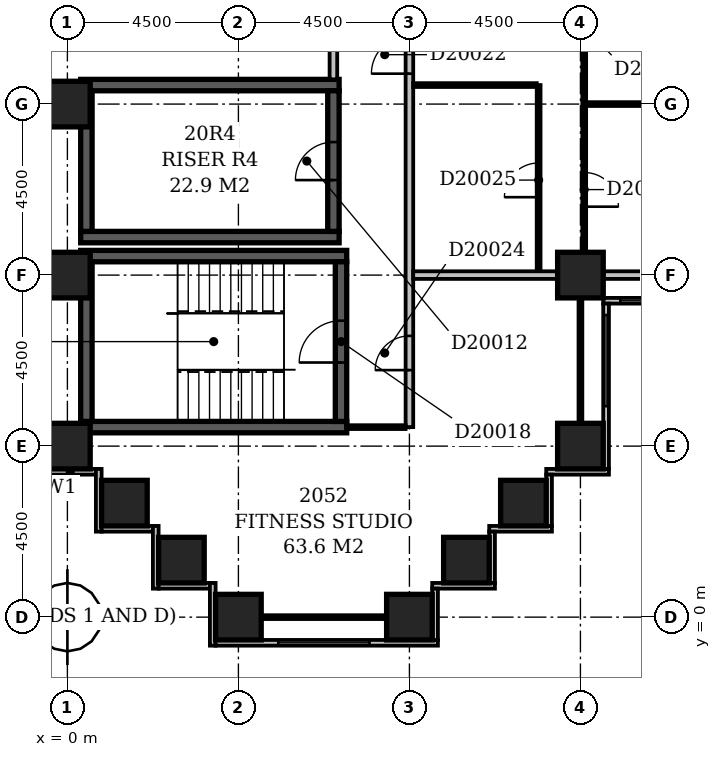
"""IFC4 building model, lengths in metres.
Left out: names, types, materials, properties, quantities, classifications, styles, units other than length and angle.
Written with IfcOpenShell. Run it as: python <this file> out.ifc"""

import sys

from ifc_helpers import new_model, si_unit, direction, frame, frame_2d, origin, origin_2d, place, context, subcontext, project, spatial, rectangle, extrude, element, fill, save


model = new_model("IFC4")
c1 = context("Model", 3, precision=1e-05, world=origin(), true_north=direction((0.0, 1.0)))
c2 = subcontext(c1, "Body", "Model", "MODEL_VIEW")
j1 = project(units=[si_unit("LENGTHUNIT", "METRE"), si_unit("PLANEANGLEUNIT", "RADIAN")], contexts=[c1])
p1 = place(None, origin())
s1 = spatial("IfcSite", under=j1, at=p1, CompositionType="ELEMENT")
p2 = place(p1, origin())
s2 = spatial("IfcBuilding", under=s1, at=p2, CompositionType="ELEMENT")
p3 = place(p2, frame((0.0, 0.0, 83.0)))
s3 = spatial("IfcBuildingStorey", under=s2, at=p3, CompositionType="ELEMENT", Elevation=83.0)
for number, where, z_axis, x_axis in (
    (1, (0.35, 5.0, -0.3), (0.0, 0.0, 1.0), (1.0, 0.0, 0.0)),
    (2, (0.35, 9.5, -0.3), (0.0, 0.0, 1.0), (1.0, 0.0, 0.0)),
):
    element("IfcWall", number, at=place(p3, frame(where, z_axis=z_axis, x_axis=x_axis)), inside=s3, PredefinedType="SHEAR", context=c2, shape_type="SweptSolid", body=[
        extrude(rectangle(XDim=7.0, YDim=0.3, at=frame_2d((3.5, 0.0))), origin(), (0.0, 0.0, 1.0), 3.6),
    ])
for number, where, z_axis, x_axis in (
    (3, (0.35, 10.0, -0.3), (0.0, 0.0, 1.0), (1.0, 0.0, 0.0)),
    (4, (0.35, 14.0, -0.3), (0.0, 0.0, 1.0), (1.0, 0.0, 0.0)),
):
    element("IfcWall", number, at=place(p3, frame(where, z_axis=z_axis, x_axis=x_axis)), inside=s3, PredefinedType="SHEAR", context=c2, shape_type="SweptSolid", body=[
        extrude(rectangle(XDim=6.8, YDim=0.3, at=frame_2d((3.4, 0.0))), origin(), (0.0, 0.0, 1.0), 3.6),
    ])
p4 = place(p3, frame((0.5, 5.15, -0.3), z_axis=(0.0, 0.0, 1.0), x_axis=(0.0, 1.0, 0.0)))
e5 = element("IfcWall", 5, at=p4, inside=s3, PredefinedType="SHEAR", context=c2, shape_type="SweptSolid", body=[
    extrude(rectangle(XDim=4.2, YDim=0.3, at=frame_2d((2.1, 0.0))), origin(), (0.0, 0.0, 1.0), 3.6),
])
p5 = place(p3, frame((0.5, 10.15, -0.3), z_axis=(0.0, 0.0, 1.0), x_axis=(0.0, 1.0, 0.0)))
e6 = element("IfcWall", 6, at=p5, inside=s3, PredefinedType="SHEAR", context=c2, shape_type="SweptSolid", body=[
    extrude(rectangle(XDim=3.7, YDim=0.3, at=frame_2d((1.85, 0.0))), origin(), (0.0, 0.0, 1.0), 3.6),
])
p6 = place(p3, frame((7.0, 10.15, -0.3), z_axis=(0.0, 0.0, 1.0), x_axis=(0.0, 1.0, 0.0)))
e7 = element("IfcWall", 7, at=p6, inside=s3, PredefinedType="SHEAR", context=c2, shape_type="SweptSolid", body=[
    extrude(rectangle(XDim=3.7, YDim=0.3, at=frame_2d((1.85, 0.0))), origin(), (0.0, 0.0, 1.0), 3.6),
])
p7 = place(p6, frame((1.35, 0.0, 0.3)))
e8 = element("IfcOpeningElement", 8, at=p7, cuts=e7, PredefinedType="OPENING", context=c2, shape_type="SweptSolid", body=[
    extrude(rectangle(XDim=1.0, YDim=2.1, at=frame_2d((0.5, 1.05))), frame((0.0, 0.162, 0.0), z_axis=(0.0, -1.0, 0.0), x_axis=(1.0, 0.0, 0.0)), (0.0, 0.0, 1.0), 0.324),
])
p8 = place(p3, frame((7.2, 5.15, -0.3), z_axis=(0.0, 0.0, 1.0), x_axis=(0.0, 1.0, 0.0)))
e9 = element("IfcWall", 9, at=p8, inside=s3, PredefinedType="SHEAR", context=c2, shape_type="SweptSolid", body=[
    extrude(rectangle(XDim=4.2, YDim=0.3, at=frame_2d((2.1, 0.0))), origin(), (0.0, 0.0, 1.0), 3.6),
])
p9 = place(p8, frame((1.55, 0.0, 0.3)))
e10 = element("IfcOpeningElement", 10, at=p9, cuts=e9, PredefinedType="OPENING", context=c2, shape_type="SweptSolid", body=[
    extrude(rectangle(XDim=1.1, YDim=2.1, at=frame_2d((0.55, 1.05))), frame((0.0, 0.162, 0.0), z_axis=(0.0, -1.0, 0.0), x_axis=(1.0, 0.0, 0.0)), (0.0, 0.0, 1.0), 0.324),
])
for number, where, z_axis, x_axis in (
    (11, (4.5, 0.0, -0.3), (0.0, 0.0, 1.0), (1.0, 0.0, 0.0)),
    (12, (9.0, 0.0, -0.3), (0.0, 0.0, 1.0), (1.0, 0.0, 0.0)),
    (13, (3.0, 1.5, -0.3), (0.0, 0.0, 1.0), (1.0, 0.0, 0.0)),
    (14, (10.5, 1.5, -0.3), (0.0, 0.0, 1.0), (1.0, 0.0, 0.0)),
    (15, (1.5, 3.0, -0.3), (0.0, 0.0, 1.0), (1.0, 0.0, 0.0)),
    (16, (12.0, 3.0, -0.3), (0.0, 0.0, 1.0), (1.0, 0.0, 0.0)),
    (17, (0.0, 4.5, -0.3), (0.0, 0.0, 1.0), (1.0, 0.0, 0.0)),
    (18, (13.5, 4.5, -0.3), (0.0, 0.0, 1.0), (1.0, 0.0, 0.0)),
    (19, (0.0, 9.0, -0.3), (0.0, 0.0, 1.0), (1.0, 0.0, 0.0)),
    (20, (13.5, 9.0, -0.3), (0.0, 0.0, 1.0), (1.0, 0.0, 0.0)),
    (21, (0.0, 13.5, -0.3), (0.0, 0.0, 1.0), (1.0, 0.0, 0.0)),
):
    element("IfcColumn", number, at=place(p3, frame(where, z_axis=z_axis, x_axis=x_axis)), inside=s3, PredefinedType="COLUMN", context=c2, shape_type="SweptSolid", body=[
        extrude(rectangle(XDim=1.2, YDim=1.2, at=origin_2d()), origin(), (0.0, 0.0, 1.0), 3.6),
    ])
p10 = place(p3, frame((9.675, -0.6, 0.0), z_axis=(0.0, 0.0, 1.0), x_axis=(0.0, 1.0, 0.0)))
e22 = element("IfcWall", 22, at=p10, inside=s3, PredefinedType="STANDARD", context=c2, shape_type="SweptSolid", body=[
    extrude(rectangle(XDim=1.35, YDim=0.15, at=frame_2d((0.675, 0.0))), origin(), (0.0, 0.0, 1.0), 2.7),
])
p11 = place(p3, frame((9.6, 0.825, 0.0), z_axis=(0.0, 0.0, 1.0), x_axis=(1.0, 0.0, 0.0)))
e23 = element("IfcWall", 23, at=p11, inside=s3, PredefinedType="STANDARD", context=c2, shape_type="SweptSolid", body=[
    extrude(rectangle(XDim=1.65, YDim=0.15, at=frame_2d((0.825, 0.0))), origin(), (0.0, 0.0, 1.0), 2.7),
])
p12 = place(p3, frame((11.175, 0.9, 0.0), z_axis=(0.0, 0.0, 1.0), x_axis=(0.0, 1.0, 0.0)))
e24 = element("IfcWall", 24, at=p12, inside=s3, PredefinedType="STANDARD", context=c2, shape_type="SweptSolid", body=[
    extrude(rectangle(XDim=1.35, YDim=0.15, at=frame_2d((0.675, 0.0))), origin(), (0.0, 0.0, 1.0), 2.7),
])
p13 = place(p3, frame((11.1, 2.325, 0.0), z_axis=(0.0, 0.0, 1.0), x_axis=(1.0, 0.0, 0.0)))
e25 = element("IfcWall", 25, at=p13, inside=s3, PredefinedType="STANDARD", context=c2, shape_type="SweptSolid", body=[
    extrude(rectangle(XDim=1.65, YDim=0.15, at=frame_2d((0.825, 0.0))), origin(), (0.0, 0.0, 1.0), 2.7),
])
p14 = place(p3, frame((12.675, 2.4, 0.0), z_axis=(0.0, 0.0, 1.0), x_axis=(0.0, 1.0, 0.0)))
e26 = element("IfcWall", 26, at=p14, inside=s3, PredefinedType="STANDARD", context=c2, shape_type="SweptSolid", body=[
    extrude(rectangle(XDim=1.35, YDim=0.15, at=frame_2d((0.675, 0.0))), origin(), (0.0, 0.0, 1.0), 2.7),
])
p15 = place(p3, frame((12.6, 3.825, 0.0), z_axis=(0.0, 0.0, 1.0), x_axis=(1.0, 0.0, 0.0)))
e27 = element("IfcWall", 27, at=p15, inside=s3, PredefinedType="STANDARD", context=c2, shape_type="SweptSolid", body=[
    extrude(rectangle(XDim=1.65, YDim=0.15, at=frame_2d((0.825, 0.0))), origin(), (0.0, 0.0, 1.0), 2.7),
])
p16 = place(p3, frame((14.175, 3.9, 0.0), z_axis=(0.0, 0.0, 1.0), x_axis=(0.0, 1.0, 0.0)))
e28 = element("IfcWall", 28, at=p16, inside=s3, PredefinedType="STANDARD", context=c2, shape_type="SweptSolid", body=[
    extrude(rectangle(XDim=4.35, YDim=0.15, at=frame_2d((2.175, 0.0))), origin(), (0.0, 0.0, 1.0), 2.7),
])
p17 = place(p16, frame((1.65, 0.0, 0.6)))
e29 = element("IfcOpeningElement", 29, at=p17, cuts=e28, PredefinedType="OPENING", context=c2, shape_type="SweptSolid", body=[
    extrude(rectangle(XDim=2.4, YDim=1.8, at=frame_2d((1.2, 0.9))), frame((0.0, 0.087, 0.0), z_axis=(0.0, -1.0, 0.0), x_axis=(1.0, 0.0, 0.0)), (0.0, 0.0, 1.0), 0.174),
])
p18 = place(p3, frame((14.1, 8.325, 0.0), z_axis=(0.0, 0.0, 1.0), x_axis=(1.0, 0.0, 0.0)))
e30 = element("IfcWall", 30, at=p18, inside=s3, PredefinedType="STANDARD", context=c2, shape_type="SweptSolid", body=[
    extrude(rectangle(XDim=4.65, YDim=0.15, at=frame_2d((2.325, 0.0))), origin(), (0.0, 0.0, 1.0), 2.7),
])
p19 = place(p18, frame((0.45, 0.0, 0.6)))
e31 = element("IfcOpeningElement", 31, at=p19, cuts=e30, PredefinedType="OPENING", context=c2, shape_type="SweptSolid", body=[
    extrude(rectangle(XDim=2.4, YDim=1.8, at=frame_2d((1.2, 0.9))), frame((0.0, 0.087, 0.0), z_axis=(0.0, -1.0, 0.0), x_axis=(1.0, 0.0, 0.0)), (0.0, 0.0, 1.0), 0.174),
])
p20 = place(p3, frame((-0.6, 3.825, 0.0), z_axis=(0.0, 0.0, 1.0), x_axis=(1.0, 0.0, 0.0)))
e32 = element("IfcWall", 32, at=p20, inside=s3, PredefinedType="STANDARD", context=c2, shape_type="SweptSolid", body=[
    extrude(rectangle(XDim=1.35, YDim=0.15, at=frame_2d((0.675, 0.0))), origin(), (0.0, 0.0, 1.0), 2.7),
])
p21 = place(p3, frame((0.825, 3.9, 0.0), z_axis=(0.0, 0.0, 1.0), x_axis=(0.0, -1.0, 0.0)))
e33 = element("IfcWall", 33, at=p21, inside=s3, PredefinedType="STANDARD", context=c2, shape_type="SweptSolid", body=[
    extrude(rectangle(XDim=1.65, YDim=0.15, at=frame_2d((0.825, 0.0))), origin(), (0.0, 0.0, 1.0), 2.7),
])
p22 = place(p3, frame((0.9, 2.325, 0.0), z_axis=(0.0, 0.0, 1.0), x_axis=(1.0, 0.0, 0.0)))
e34 = element("IfcWall", 34, at=p22, inside=s3, PredefinedType="STANDARD", context=c2, shape_type="SweptSolid", body=[
    extrude(rectangle(XDim=1.35, YDim=0.15, at=frame_2d((0.675, 0.0))), origin(), (0.0, 0.0, 1.0), 2.7),
])
p23 = place(p3, frame((2.325, 2.4, 0.0), z_axis=(0.0, 0.0, 1.0), x_axis=(0.0, -1.0, 0.0)))
e35 = element("IfcWall", 35, at=p23, inside=s3, PredefinedType="STANDARD", context=c2, shape_type="SweptSolid", body=[
    extrude(rectangle(XDim=1.65, YDim=0.15, at=frame_2d((0.825, 0.0))), origin(), (0.0, 0.0, 1.0), 2.7),
])
p24 = place(p3, frame((2.4, 0.825, 0.0), z_axis=(0.0, 0.0, 1.0), x_axis=(1.0, 0.0, 0.0)))
e36 = element("IfcWall", 36, at=p24, inside=s3, PredefinedType="STANDARD", context=c2, shape_type="SweptSolid", body=[
    extrude(rectangle(XDim=1.35, YDim=0.15, at=frame_2d((0.675, 0.0))), origin(), (0.0, 0.0, 1.0), 2.7),
])
p25 = place(p3, frame((3.825, 0.9, 0.0), z_axis=(0.0, 0.0, 1.0), x_axis=(0.0, -1.0, 0.0)))
e37 = element("IfcWall", 37, at=p25, inside=s3, PredefinedType="STANDARD", context=c2, shape_type="SweptSolid", body=[
    extrude(rectangle(XDim=1.65, YDim=0.15, at=frame_2d((0.825, 0.0))), origin(), (0.0, 0.0, 1.0), 2.7),
])
p26 = place(p3, frame((3.9, -0.675, 0.0), z_axis=(0.0, 0.0, 1.0), x_axis=(1.0, 0.0, 0.0)))
e38 = element("IfcWall", 38, at=p26, inside=s3, PredefinedType="STANDARD", context=c2, shape_type="SweptSolid", body=[
    extrude(rectangle(XDim=5.85, YDim=0.15, at=frame_2d((2.925, 0.0))), origin(), (0.0, 0.0, 1.0), 2.7),
])
p27 = place(p26, frame((1.65, 0.0, 0.6)))
e39 = element("IfcOpeningElement", 39, at=p27, cuts=e38, PredefinedType="OPENING", context=c2, shape_type="SweptSolid", body=[
    extrude(rectangle(XDim=2.4, YDim=1.8, at=frame_2d((1.2, 0.9))), frame((0.0, 0.087, 0.0), z_axis=(0.0, -1.0, 0.0), x_axis=(1.0, 0.0, 0.0)), (0.0, 0.0, 1.0), 0.174),
])
p28 = place(p3, frame((5.1, 0.0, 0.0), z_axis=(0.0, 0.0, 1.0), x_axis=(1.0, 0.0, 0.0)))
e40 = element("IfcWall", 40, at=p28, inside=s3, PredefinedType="PARTITIONING", context=c2, shape_type="SweptSolid", body=[
    extrude(rectangle(XDim=3.3, YDim=0.1, at=frame_2d((1.65, 0.0))), origin(), (0.0, 0.0, 1.0), 2.7),
])
p29 = place(p3, frame((0.0, 4.4, 0.0), z_axis=(0.0, 0.0, 1.0), x_axis=(0.0, 1.0, 0.0)))
e41 = element("IfcWall", 41, at=p29, inside=s3, PredefinedType="PARTITIONING", context=c2, shape_type="SweptSolid", body=[
    extrude(rectangle(XDim=0.7, YDim=0.1, at=frame_2d((0.35, 0.0))), origin(), (0.0, 0.0, 1.0), 2.7),
])
p30 = place(p3, frame((7.349, 5.0, 0.0), z_axis=(0.0, 0.0, 1.0), x_axis=(1.0, 0.0, 0.0)))
e42 = element("IfcWall", 42, at=p30, inside=s3, PredefinedType="PARTITIONING", context=c2, shape_type="SweptSolid", body=[
    extrude(rectangle(XDim=1.551, YDim=0.1, at=frame_2d((0.775, 0.0))), origin(), (0.0, 0.0, 1.0), 3.3),
])
p31 = place(p3, frame((9.0, 5.0, 0.0), z_axis=(0.0, 0.0, 1.0), x_axis=(0.0, 1.0, 0.0)))
e43 = element("IfcWall", 43, at=p31, inside=s3, PredefinedType="PARTITIONING", context=c2, shape_type="SweptSolid", body=[
    extrude(rectangle(XDim=44.5, YDim=0.2, at=frame_2d((22.25, 0.0))), origin(), (0.0, 0.0, 1.0), 3.3),
])
p32 = place(p31, frame((28.45, 0.0, 0.0)))
e44 = element("IfcOpeningElement", 44, at=p32, cuts=e43, PredefinedType="OPENING", context=c2, shape_type="SweptSolid", body=[
    extrude(rectangle(XDim=1.0, YDim=2.1, at=frame_2d((0.5, 1.05))), frame((0.0, 0.112, 0.0), z_axis=(0.0, -1.0, 0.0), x_axis=(1.0, 0.0, 0.0)), (0.0, 0.0, 1.0), 0.224),
])
p33 = place(p31, frame((22.8, 0.0, 0.0)))
e45 = element("IfcOpeningElement", 45, at=p33, cuts=e43, PredefinedType="OPENING", context=c2, shape_type="SweptSolid", body=[
    extrude(rectangle(XDim=1.0, YDim=2.1, at=frame_2d((0.5, 1.05))), frame((0.0, 0.112, 0.0), z_axis=(0.0, -1.0, 0.0), x_axis=(1.0, 0.0, 0.0)), (0.0, 0.0, 1.0), 0.224),
])
p34 = place(p31, frame((14.55, 0.0, 0.0)))
e46 = element("IfcOpeningElement", 46, at=p34, cuts=e43, PredefinedType="OPENING", context=c2, shape_type="SweptSolid", body=[
    extrude(rectangle(XDim=1.0, YDim=2.1, at=frame_2d((0.5, 1.05))), frame((0.0, 0.112, 0.0), z_axis=(0.0, -1.0, 0.0), x_axis=(1.0, 0.0, 0.0)), (0.0, 0.0, 1.0), 0.224),
])
p35 = place(p31, frame((9.3, 0.0, 0.0)))
e47 = element("IfcOpeningElement", 47, at=p35, cuts=e43, PredefinedType="OPENING", context=c2, shape_type="SweptSolid", body=[
    extrude(rectangle(XDim=1.0, YDim=2.1, at=frame_2d((0.5, 1.05))), frame((0.0, 0.112, 0.0), z_axis=(0.0, -1.0, 0.0), x_axis=(1.0, 0.0, 0.0)), (0.0, 0.0, 1.0), 0.224),
])
p36 = place(p31, frame((35.0, 0.0, 0.0)))
e48 = element("IfcOpeningElement", 48, at=p36, cuts=e43, PredefinedType="OPENING", context=c2, shape_type="SweptSolid", body=[
    extrude(rectangle(XDim=0.9, YDim=2.1, at=frame_2d((0.45, 1.05))), frame((0.0, 0.112, 0.0), z_axis=(0.0, -1.0, 0.0), x_axis=(1.0, 0.0, 0.0)), (0.0, 0.0, 1.0), 0.224),
])
p37 = place(p31, frame((1.5, 0.0, 0.0)))
e49 = element("IfcOpeningElement", 49, at=p37, cuts=e43, PredefinedType="OPENING", context=c2, shape_type="SweptSolid", body=[
    extrude(rectangle(XDim=0.9, YDim=2.1, at=frame_2d((0.45, 1.05))), frame((0.0, 0.112, 0.0), z_axis=(0.0, -1.0, 0.0), x_axis=(1.0, 0.0, 0.0)), (0.0, 0.0, 1.0), 0.224),
])
p38 = place(p3, frame((13.5, 5.1, 0.0), z_axis=(0.0, 0.0, 1.0), x_axis=(0.0, 1.0, 0.0)))
e50 = element("IfcWall", 50, at=p38, inside=s3, PredefinedType="PARTITIONING", context=c2, shape_type="SweptSolid", body=[
    extrude(rectangle(XDim=3.3, YDim=0.1, at=frame_2d((1.65, 0.0))), origin(), (0.0, 0.0, 1.0), 2.7),
])
p39 = place(p3, frame((9.1, 9.0, 0.0), z_axis=(0.0, 0.0, 1.0), x_axis=(1.0, 0.0, 0.0)))
e51 = element("IfcWall", 51, at=p39, inside=s3, PredefinedType="PARTITIONING", context=c2, shape_type="SweptSolid", body=[
    extrude(rectangle(XDim=3.8, YDim=0.2, at=frame_2d((1.9, 0.0))), origin(), (0.0, 0.0, 1.0), 3.3),
])
p40 = place(p3, frame((14.1, 9.0, 0.0), z_axis=(0.0, 0.0, 1.0), x_axis=(1.0, 0.0, 0.0)))
e52 = element("IfcWall", 52, at=p40, inside=s3, PredefinedType="PARTITIONING", context=c2, shape_type="SweptSolid", body=[
    extrude(rectangle(XDim=3.3, YDim=0.2, at=frame_2d((1.65, 0.0))), origin(), (0.0, 0.0, 1.0), 2.7),
])
p41 = place(p3, frame((12.4, 9.1, 0.0), z_axis=(0.0, 0.0, 1.0), x_axis=(0.0, 1.0, 0.0)))
e53 = element("IfcWall", 53, at=p41, inside=s3, PredefinedType="PARTITIONING", context=c2, shape_type="SweptSolid", body=[
    extrude(rectangle(XDim=4.9, YDim=0.1, at=frame_2d((2.45, 0.0))), origin(), (0.0, 0.0, 1.0), 3.3),
])
p42 = place(p41, frame((1.95, 0.0, 0.0)))
e54 = element("IfcOpeningElement", 54, at=p42, cuts=e53, PredefinedType="OPENING", context=c2, shape_type="SweptSolid", body=[
    extrude(rectangle(XDim=0.9, YDim=2.1, at=frame_2d((0.45, 1.05))), frame((0.0, 0.062, 0.0), z_axis=(0.0, -1.0, 0.0), x_axis=(1.0, 0.0, 0.0)), (0.0, 0.0, 1.0), 0.124),
])
p43 = place(p3, frame((13.6, 9.6, 0.0), z_axis=(0.0, 0.0, 1.0), x_axis=(0.0, 1.0, 0.0)))
e55 = element("IfcWall", 55, at=p43, inside=s3, PredefinedType="PARTITIONING", context=c2, shape_type="SweptSolid", body=[
    extrude(rectangle(XDim=8.3, YDim=0.1, at=frame_2d((4.15, 0.0))), origin(), (0.0, 0.0, 1.0), 3.3),
])
p44 = place(p43, frame((1.2, 0.0, 0.0)))
e56 = element("IfcOpeningElement", 56, at=p44, cuts=e55, PredefinedType="OPENING", context=c2, shape_type="SweptSolid", body=[
    extrude(rectangle(XDim=0.9, YDim=2.1, at=frame_2d((0.45, 1.05))), frame((0.0, 0.062, 0.0), z_axis=(0.0, -1.0, 0.0), x_axis=(1.0, 0.0, 0.0)), (0.0, 0.0, 1.0), 0.124),
])
p45 = place(p43, frame((5.7, 0.0, 0.0)))
e57 = element("IfcOpeningElement", 57, at=p45, cuts=e55, PredefinedType="OPENING", context=c2, shape_type="SweptSolid", body=[
    extrude(rectangle(XDim=0.9, YDim=2.1, at=frame_2d((0.45, 1.05))), frame((0.0, 0.062, 0.0), z_axis=(0.0, -1.0, 0.0), x_axis=(1.0, 0.0, 0.0)), (0.0, 0.0, 1.0), 0.124),
])
p46 = place(p3, frame((13.65, 13.5, 0.0), z_axis=(0.0, 0.0, 1.0), x_axis=(1.0, 0.0, 0.0)))
e58 = element("IfcWall", 58, at=p46, inside=s3, PredefinedType="PARTITIONING", context=c2, shape_type="SweptSolid", body=[
    extrude(rectangle(XDim=3.75, YDim=0.1, at=frame_2d((1.875, 0.0))), origin(), (0.0, 0.0, 1.0), 3.3),
])
p47 = place(p3, frame((9.1, 14.0, 0.0), z_axis=(0.0, 0.0, 1.0), x_axis=(1.0, 0.0, 0.0)))
e59 = element("IfcWall", 59, at=p47, inside=s3, PredefinedType="PARTITIONING", context=c2, shape_type="SweptSolid", body=[
    extrude(rectangle(XDim=3.25, YDim=0.1, at=frame_2d((1.625, 0.0))), origin(), (0.0, 0.0, 1.0), 3.3),
])
p48 = place(p3, frame((7.0, 14.15, 0.0), z_axis=(0.0, 0.0, 1.0), x_axis=(0.0, 1.0, 0.0)))
e60 = element("IfcWall", 60, at=p48, inside=s3, PredefinedType="PARTITIONING", context=c2, shape_type="SweptSolid", body=[
    extrude(rectangle(XDim=4.2, YDim=0.2, at=frame_2d((2.1, 0.0))), origin(), (0.0, 0.0, 1.0), 3.3),
])
p49 = place(p48, frame((1.6, 0.0, 0.0)))
e61 = element("IfcOpeningElement", 61, at=p49, cuts=e60, PredefinedType="OPENING", context=c2, shape_type="SweptSolid", body=[
    extrude(rectangle(XDim=1.0, YDim=2.1, at=frame_2d((0.5, 1.05))), frame((0.0, 0.112, 0.0), z_axis=(0.0, -1.0, 0.0), x_axis=(1.0, 0.0, 0.0)), (0.0, 0.0, 1.0), 0.224),
])
p50 = place(p17, origin())
e62 = element("IfcWindow", 62, at=p50, inside=s3, PartitioningType="SINGLE_PANEL", PredefinedType="WINDOW", context=c2, shape_type="SweptSolid", body=[
    extrude(rectangle(XDim=2.4, YDim=1.8, at=frame_2d((1.2, 0.9))), frame((0.0, 0.03, 0.0), z_axis=(0.0, -1.0, 0.0), x_axis=(1.0, 0.0, 0.0)), (0.0, 0.0, 1.0), 0.06),
])
fill(e29, e62)
p51 = place(p19, origin())
e63 = element("IfcWindow", 63, at=p51, inside=s3, PartitioningType="SINGLE_PANEL", PredefinedType="WINDOW", context=c2, shape_type="SweptSolid", body=[
    extrude(rectangle(XDim=2.4, YDim=1.8, at=frame_2d((1.2, 0.9))), frame((0.0, 0.03, 0.0), z_axis=(0.0, -1.0, 0.0), x_axis=(1.0, 0.0, 0.0)), (0.0, 0.0, 1.0), 0.06),
])
fill(e31, e63)
p52 = place(p27, origin())
e64 = element("IfcWindow", 64, at=p52, inside=s3, PartitioningType="SINGLE_PANEL", PredefinedType="WINDOW", context=c2, shape_type="SweptSolid", body=[
    extrude(rectangle(XDim=2.4, YDim=1.8, at=frame_2d((1.2, 0.9))), frame((0.0, 0.03, 0.0), z_axis=(0.0, -1.0, 0.0), x_axis=(1.0, 0.0, 0.0)), (0.0, 0.0, 1.0), 0.06),
])
fill(e39, e64)
p53 = place(p7, origin())
e65 = element("IfcDoor", 65, at=p53, inside=s3, OperationType="SINGLE_SWING_LEFT", PredefinedType="DOOR", context=c2, shape_type="SweptSolid", body=[
    extrude(rectangle(XDim=1.0, YDim=2.1, at=frame_2d((0.5, 1.05))), frame((0.0, 0.025, 0.0), z_axis=(0.0, -1.0, 0.0), x_axis=(1.0, 0.0, 0.0)), (0.0, 0.0, 1.0), 0.05),
])
fill(e8, e65)
p54 = place(p9, origin())
e66 = element("IfcDoor", 66, at=p54, inside=s3, OperationType="SINGLE_SWING_LEFT", PredefinedType="DOOR", context=c2, shape_type="SweptSolid", body=[
    extrude(rectangle(XDim=1.1, YDim=2.1, at=frame_2d((0.55, 1.05))), frame((0.0, 0.025, 0.0), z_axis=(0.0, -1.0, 0.0), x_axis=(1.0, 0.0, 0.0)), (0.0, 0.0, 1.0), 0.05),
])
fill(e10, e66)
p55 = place(p35, origin())
e67 = element("IfcDoor", 67, at=p55, inside=s3, OperationType="SINGLE_SWING_LEFT", PredefinedType="DOOR", context=c2, shape_type="SweptSolid", body=[
    extrude(rectangle(XDim=1.0, YDim=2.1, at=frame_2d((0.5, 1.05))), frame((0.0, 0.025, 0.0), z_axis=(0.0, -1.0, 0.0), x_axis=(1.0, 0.0, 0.0)), (0.0, 0.0, 1.0), 0.05),
])
fill(e47, e67)
p56 = place(p37, origin())
e68 = element("IfcDoor", 68, at=p56, inside=s3, OperationType="SINGLE_SWING_LEFT", PredefinedType="DOOR", context=c2, shape_type="SweptSolid", body=[
    extrude(rectangle(XDim=0.9, YDim=2.1, at=frame_2d((0.45, 1.05))), frame((0.0, 0.025, 0.0), z_axis=(0.0, -1.0, 0.0), x_axis=(1.0, 0.0, 0.0)), (0.0, 0.0, 1.0), 0.05),
])
fill(e49, e68)
p57 = place(p42, origin())
e69 = element("IfcDoor", 69, at=p57, inside=s3, OperationType="SINGLE_SWING_LEFT", PredefinedType="DOOR", context=c2, shape_type="SweptSolid", body=[
    extrude(rectangle(XDim=0.9, YDim=2.1, at=frame_2d((0.45, 1.05))), frame((0.0, 0.025, 0.0), z_axis=(0.0, -1.0, 0.0), x_axis=(1.0, 0.0, 0.0)), (0.0, 0.0, 1.0), 0.05),
])
fill(e54, e69)
p58 = place(p44, frame((0.9, 0.0, 0.0), z_axis=(0.0, 0.0, 1.0), x_axis=(-1.0, 0.0, 0.0)))
e70 = element("IfcDoor", 70, at=p58, inside=s3, OperationType="SINGLE_SWING_RIGHT", PredefinedType="DOOR", context=c2, shape_type="SweptSolid", body=[
    extrude(rectangle(XDim=0.9, YDim=2.1, at=frame_2d((0.45, 1.05))), frame((0.0, 0.025, 0.0), z_axis=(0.0, -1.0, 0.0), x_axis=(1.0, 0.0, 0.0)), (0.0, 0.0, 1.0), 0.05),
])
fill(e56, e70)
save(model, sys.argv[1])
